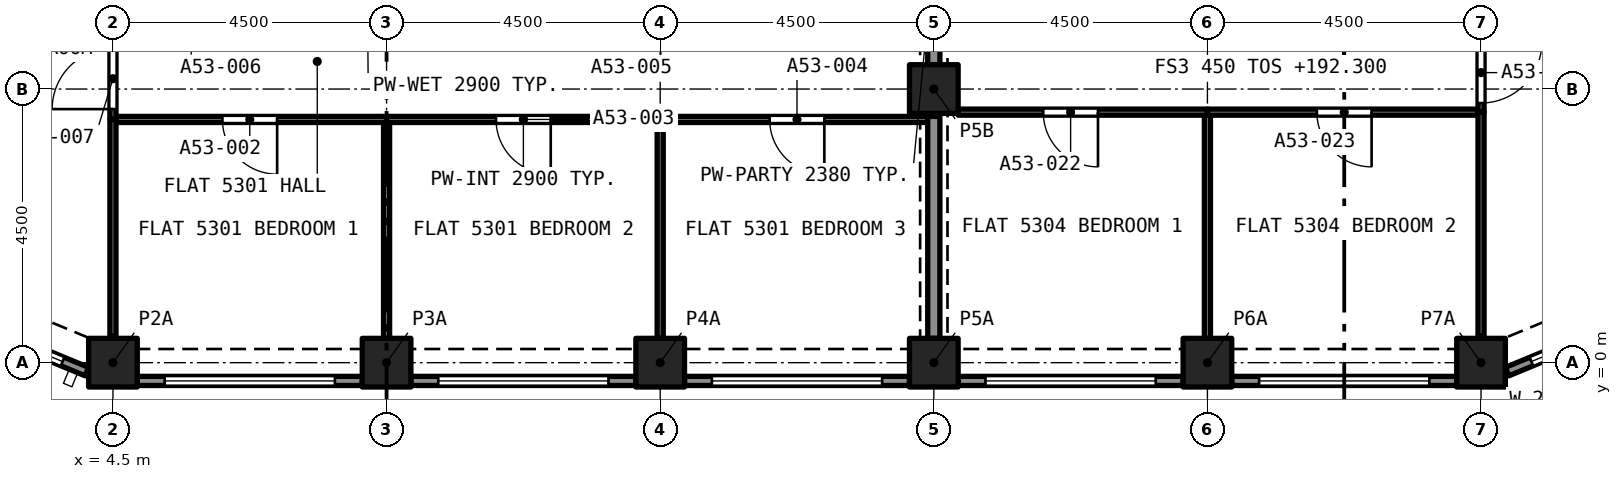
"""IFC4 building model, lengths in metres.
Left out: names, types, materials, properties, quantities, classifications, styles, units other than length and angle.
Written with IfcOpenShell. Run it as: python <this file> out.ifc"""

import sys

from ifc_helpers import new_model, si_unit, direction, frame, frame_2d, origin, origin_2d, place, context, subcontext, project, spatial, rectangle, extrude, element, fill, save


model = new_model("IFC4")
c1 = context("Model", 3, precision=1e-05, world=origin(), true_north=direction((0.0, 1.0)))
c2 = subcontext(c1, "Body", "Model", "MODEL_VIEW")
j1 = project(units=[si_unit("LENGTHUNIT", "METRE"), si_unit("PLANEANGLEUNIT", "RADIAN")], contexts=[c1])
p1 = place(None, origin())
s1 = spatial("IfcSite", under=j1, at=p1, CompositionType="ELEMENT")
p2 = place(p1, origin())
s2 = spatial("IfcBuilding", under=s1, at=p2, CompositionType="ELEMENT")
p3 = place(p2, frame((0.0, 0.0, 192.3)))
s3 = spatial("IfcBuildingStorey", under=s2, at=p3, CompositionType="ELEMENT", Elevation=192.3)
for number, where, z_axis, x_axis in (
    (1, (4.5, 0.0, 0.0), (0.0, 0.0, 1.0), (1.0, 0.0, 0.0)),
    (2, (9.0, 0.0, 0.0), (0.0, 0.0, 1.0), (1.0, 0.0, 0.0)),
    (3, (13.5, 0.0, 0.0), (0.0, 0.0, 1.0), (1.0, 0.0, 0.0)),
    (4, (18.0, 0.0, 0.0), (0.0, 0.0, 1.0), (1.0, 0.0, 0.0)),
    (5, (22.5, 0.0, 0.0), (0.0, 0.0, 1.0), (1.0, 0.0, 0.0)),
    (6, (27.0, 0.0, 0.0), (0.0, 0.0, 1.0), (1.0, 0.0, 0.0)),
    (7, (18.0, 4.5, 0.0), (0.0, 0.0, 1.0), (1.0, 0.0, 0.0)),
):
    element("IfcColumn", number, at=place(p3, frame(where, z_axis=z_axis, x_axis=x_axis)), inside=s3, PredefinedType="COLUMN", context=c2, shape_type="SweptSolid", body=[
        extrude(rectangle(XDim=0.8, YDim=0.8, at=origin_2d()), origin(), (0.0, 0.0, 1.0), 3.2),
    ])
p4 = place(p3, frame((29.833, 0.849, 0.0), z_axis=(0.0, 0.0, 1.0), x_axis=(-0.923885342263, -0.382669406082, 0.0)))
e8 = element("IfcWall", 8, at=p4, inside=s3, PredefinedType="SOLIDWALL", context=c2, shape_type="SweptSolid", body=[
    extrude(rectangle(XDim=2.602, YDim=0.15, at=frame_2d((1.301, 0.0))), origin(), (0.0, 0.0, 1.0), 3.2),
])
p5 = place(p4, frame((0.27, 0.0, 0.45)))
e9 = element("IfcOpeningElement", 9, at=p5, cuts=e8, PredefinedType="OPENING", context=c2, shape_type="SweptSolid", body=[
    extrude(rectangle(XDim=1.9, YDim=1.95, at=frame_2d((0.95, 0.975))), frame((0.0, 0.085, 0.0), z_axis=(0.0, -1.0, 0.0), x_axis=(1.0, 0.0, 0.0)), (0.0, 0.0, 1.0), 0.17),
])
p6 = place(p3, frame((4.071, -0.147, 0.0), z_axis=(0.0, 0.0, 1.0), x_axis=(-0.923885342263, 0.382669406082, 0.0)))
e10 = element("IfcWall", 10, at=p6, inside=s3, PredefinedType="SOLIDWALL", context=c2, shape_type="SweptSolid", body=[
    extrude(rectangle(XDim=2.602, YDim=0.15, at=frame_2d((1.301, 0.0))), origin(), (0.0, 0.0, 1.0), 3.2),
])
p7 = place(p6, frame((0.432, 0.0, 0.45)))
e11 = element("IfcOpeningElement", 11, at=p7, cuts=e10, PredefinedType="OPENING", context=c2, shape_type="SweptSolid", body=[
    extrude(rectangle(XDim=1.9, YDim=1.95, at=frame_2d((0.95, 0.975))), frame((0.0, 0.085, 0.0), z_axis=(0.0, -1.0, 0.0), x_axis=(1.0, 0.0, 0.0)), (0.0, 0.0, 1.0), 0.17),
])
p8 = place(p3, frame((8.6, -0.3, 0.0), z_axis=(0.0, 0.0, 1.0), x_axis=(-1.0, 0.0, 0.0)))
e12 = element("IfcWall", 12, at=p8, inside=s3, PredefinedType="SOLIDWALL", context=c2, shape_type="SweptSolid", body=[
    extrude(rectangle(XDim=3.7, YDim=0.15, at=frame_2d((1.85, 0.0))), origin(), (0.0, 0.0, 1.0), 3.2),
])
p9 = place(p8, frame((0.45, 0.0, 0.45)))
e13 = element("IfcOpeningElement", 13, at=p9, cuts=e12, PredefinedType="OPENING", context=c2, shape_type="SweptSolid", body=[
    extrude(rectangle(XDim=2.8, YDim=1.95, at=frame_2d((1.4, 0.975))), frame((0.0, 0.085, 0.0), z_axis=(0.0, -1.0, 0.0), x_axis=(1.0, 0.0, 0.0)), (0.0, 0.0, 1.0), 0.17),
])
p10 = place(p3, frame((13.1, -0.3, 0.0), z_axis=(0.0, 0.0, 1.0), x_axis=(-1.0, 0.0, 0.0)))
e14 = element("IfcWall", 14, at=p10, inside=s3, PredefinedType="SOLIDWALL", context=c2, shape_type="SweptSolid", body=[
    extrude(rectangle(XDim=3.7, YDim=0.15, at=frame_2d((1.85, 0.0))), origin(), (0.0, 0.0, 1.0), 3.2),
])
p11 = place(p10, frame((0.45, 0.0, 0.45)))
e15 = element("IfcOpeningElement", 15, at=p11, cuts=e14, PredefinedType="OPENING", context=c2, shape_type="SweptSolid", body=[
    extrude(rectangle(XDim=2.8, YDim=1.95, at=frame_2d((1.4, 0.975))), frame((0.0, 0.085, 0.0), z_axis=(0.0, -1.0, 0.0), x_axis=(1.0, 0.0, 0.0)), (0.0, 0.0, 1.0), 0.17),
])
p12 = place(p3, frame((17.6, -0.3, 0.0), z_axis=(0.0, 0.0, 1.0), x_axis=(-1.0, 0.0, 0.0)))
e16 = element("IfcWall", 16, at=p12, inside=s3, PredefinedType="SOLIDWALL", context=c2, shape_type="SweptSolid", body=[
    extrude(rectangle(XDim=3.7, YDim=0.15, at=frame_2d((1.85, 0.0))), origin(), (0.0, 0.0, 1.0), 3.2),
])
p13 = place(p12, frame((0.45, 0.0, 0.45)))
e17 = element("IfcOpeningElement", 17, at=p13, cuts=e16, PredefinedType="OPENING", context=c2, shape_type="SweptSolid", body=[
    extrude(rectangle(XDim=2.8, YDim=1.95, at=frame_2d((1.4, 0.975))), frame((0.0, 0.085, 0.0), z_axis=(0.0, -1.0, 0.0), x_axis=(1.0, 0.0, 0.0)), (0.0, 0.0, 1.0), 0.17),
])
p14 = place(p3, frame((22.1, -0.3, 0.0), z_axis=(0.0, 0.0, 1.0), x_axis=(-1.0, 0.0, 0.0)))
e18 = element("IfcWall", 18, at=p14, inside=s3, PredefinedType="SOLIDWALL", context=c2, shape_type="SweptSolid", body=[
    extrude(rectangle(XDim=3.7, YDim=0.15, at=frame_2d((1.85, 0.0))), origin(), (0.0, 0.0, 1.0), 3.2),
])
p15 = place(p14, frame((0.45, 0.0, 0.45)))
e19 = element("IfcOpeningElement", 19, at=p15, cuts=e18, PredefinedType="OPENING", context=c2, shape_type="SweptSolid", body=[
    extrude(rectangle(XDim=2.8, YDim=1.95, at=frame_2d((1.4, 0.975))), frame((0.0, 0.085, 0.0), z_axis=(0.0, -1.0, 0.0), x_axis=(1.0, 0.0, 0.0)), (0.0, 0.0, 1.0), 0.17),
])
p16 = place(p3, frame((26.6, -0.3, 0.0), z_axis=(0.0, 0.0, 1.0), x_axis=(-1.0, 0.0, 0.0)))
e20 = element("IfcWall", 20, at=p16, inside=s3, PredefinedType="SOLIDWALL", context=c2, shape_type="SweptSolid", body=[
    extrude(rectangle(XDim=3.7, YDim=0.15, at=frame_2d((1.85, 0.0))), origin(), (0.0, 0.0, 1.0), 3.2),
])
p17 = place(p16, frame((0.45, 0.0, 0.45)))
e21 = element("IfcOpeningElement", 21, at=p17, cuts=e20, PredefinedType="OPENING", context=c2, shape_type="SweptSolid", body=[
    extrude(rectangle(XDim=2.8, YDim=1.95, at=frame_2d((1.4, 0.975))), frame((0.0, 0.085, 0.0), z_axis=(0.0, -1.0, 0.0), x_axis=(1.0, 0.0, 0.0)), (0.0, 0.0, 1.0), 0.17),
])
p18 = place(p3, frame((9.0, 0.4, 0.0), z_axis=(0.0, 0.0, 1.0), x_axis=(0.0, 1.0, 0.0)))
e22 = element("IfcWall", 22, at=p18, inside=s3, PredefinedType="PARTITIONING", context=c2, shape_type="SweptSolid", body=[
    extrude(rectangle(XDim=3.55, YDim=0.1, at=frame_2d((1.775, 0.0))), origin(), (0.0, 0.0, 1.0), 2.9),
])
p19 = place(p3, frame((9.0, 4.0, 0.0), z_axis=(0.0, 0.0, 1.0), x_axis=(-1.0, 0.0, 0.0)))
e23 = element("IfcWall", 23, at=p19, inside=s3, PredefinedType="PARTITIONING", context=c2, shape_type="SweptSolid", body=[
    extrude(rectangle(XDim=4.45, YDim=0.1, at=frame_2d((2.225, 0.0))), origin(), (0.0, 0.0, 1.0), 2.9),
])
p20 = place(p19, frame((1.8, 0.0, 0.0)))
e24 = element("IfcOpeningElement", 24, at=p20, cuts=e23, PredefinedType="OPENING", context=c2, shape_type="SweptSolid", body=[
    extrude(rectangle(XDim=0.9, YDim=2.1, at=frame_2d((0.45, 1.05))), frame((0.0, 0.06, 0.0), z_axis=(0.0, -1.0, 0.0), x_axis=(1.0, 0.0, 0.0)), (0.0, 0.0, 1.0), 0.12),
])
p21 = place(p3, frame((4.5, 0.433, 0.0), z_axis=(0.0, 0.0, 1.0), x_axis=(0.0, 1.0, 0.0)))
e25 = element("IfcWall", 25, at=p21, inside=s3, PredefinedType="PARTITIONING", context=c2, shape_type="SweptSolid", body=[
    extrude(rectangle(XDim=3.567, YDim=0.1, at=frame_2d((1.784, 0.0))), origin(), (0.0, 0.0, 1.0), 2.9),
])
p22 = place(p3, frame((13.5, 0.4, 0.0), z_axis=(0.0, 0.0, 1.0), x_axis=(0.0, 1.0, 0.0)))
e26 = element("IfcWall", 26, at=p22, inside=s3, PredefinedType="PARTITIONING", context=c2, shape_type="SweptSolid", body=[
    extrude(rectangle(XDim=3.55, YDim=0.1, at=frame_2d((1.775, 0.0))), origin(), (0.0, 0.0, 1.0), 2.9),
])
p23 = place(p3, frame((13.5, 4.0, 0.0), z_axis=(0.0, 0.0, 1.0), x_axis=(-1.0, 0.0, 0.0)))
e27 = element("IfcWall", 27, at=p23, inside=s3, PredefinedType="PARTITIONING", context=c2, shape_type="SweptSolid", body=[
    extrude(rectangle(XDim=4.5, YDim=0.1, at=frame_2d((2.25, 0.0))), origin(), (0.0, 0.0, 1.0), 2.9),
])
p24 = place(p23, frame((1.8, 0.0, 0.0)))
e28 = element("IfcOpeningElement", 28, at=p24, cuts=e27, PredefinedType="OPENING", context=c2, shape_type="SweptSolid", body=[
    extrude(rectangle(XDim=0.9, YDim=2.1, at=frame_2d((0.45, 1.05))), frame((0.0, 0.06, 0.0), z_axis=(0.0, -1.0, 0.0), x_axis=(1.0, 0.0, 0.0)), (0.0, 0.0, 1.0), 0.12),
])
p25 = place(p3, frame((17.9, 4.0, 0.0), z_axis=(0.0, 0.0, 1.0), x_axis=(-1.0, 0.0, 0.0)))
e29 = element("IfcWall", 29, at=p25, inside=s3, PredefinedType="PARTITIONING", context=c2, shape_type="SweptSolid", body=[
    extrude(rectangle(XDim=4.4, YDim=0.1, at=frame_2d((2.2, 0.0))), origin(), (0.0, 0.0, 1.0), 2.9),
])
p26 = place(p25, frame((1.7, 0.0, 0.0)))
e30 = element("IfcOpeningElement", 30, at=p26, cuts=e29, PredefinedType="OPENING", context=c2, shape_type="SweptSolid", body=[
    extrude(rectangle(XDim=0.9, YDim=2.1, at=frame_2d((0.45, 1.05))), frame((0.0, 0.06, 0.0), z_axis=(0.0, -1.0, 0.0), x_axis=(1.0, 0.0, 0.0)), (0.0, 0.0, 1.0), 0.12),
])
p27 = place(p3, frame((18.0, 0.4, 0.0), z_axis=(0.0, 0.0, 1.0), x_axis=(0.0, 1.0, 0.0)))
e31 = element("IfcWall", 31, at=p27, inside=s3, PredefinedType="PARTITIONING", context=c2, shape_type="SweptSolid", body=[
    extrude(rectangle(XDim=3.65, YDim=0.2, at=frame_2d((1.825, 0.0))), origin(), (0.0, 0.0, 1.0), 2.38),
])
p28 = place(p3, frame((4.5, 4.0, 0.0), z_axis=(0.0, 0.0, 1.0), x_axis=(0.0, 1.0, 0.0)))
e32 = element("IfcWall", 32, at=p28, inside=s3, PredefinedType="PARTITIONING", context=c2, shape_type="SweptSolid", body=[
    extrude(rectangle(XDim=1.34, YDim=0.1, at=frame_2d((0.67, 0.0))), origin(), (0.0, 0.0, 1.0), 2.9),
])
p29 = place(p28, frame((0.17, 0.0, 0.0)))
e33 = element("IfcOpeningElement", 33, at=p29, cuts=e32, PredefinedType="OPENING", context=c2, shape_type="SweptSolid", body=[
    extrude(rectangle(XDim=1.0, YDim=2.1, at=frame_2d((0.5, 1.05))), frame((0.0, 0.06, 0.0), z_axis=(0.0, -1.0, 0.0), x_axis=(1.0, 0.0, 0.0)), (0.0, 0.0, 1.0), 0.12),
])
p30 = place(p3, frame((18.0, 4.9, 0.0), z_axis=(0.0, 0.0, 1.0), x_axis=(0.0, 1.0, 0.0)))
e34 = element("IfcWall", 34, at=p30, inside=s3, PredefinedType="PARTITIONING", context=c2, shape_type="SweptSolid", body=[
    extrude(rectangle(XDim=3.7, YDim=0.2, at=frame_2d((1.85, 0.0))), origin(), (0.0, 0.0, 1.0), 2.38),
])
p31 = place(p3, frame((22.5, 0.4, 0.0), z_axis=(0.0, 0.0, 1.0), x_axis=(0.0, 1.0, 0.0)))
e35 = element("IfcWall", 35, at=p31, inside=s3, PredefinedType="PARTITIONING", context=c2, shape_type="SweptSolid", body=[
    extrude(rectangle(XDim=3.67, YDim=0.1, at=frame_2d((1.835, 0.0))), origin(), (0.0, 0.0, 1.0), 2.75),
])
p32 = place(p3, frame((22.5, 4.12, 0.0), z_axis=(0.0, 0.0, 1.0), x_axis=(-1.0, 0.0, 0.0)))
e36 = element("IfcWall", 36, at=p32, inside=s3, PredefinedType="PARTITIONING", context=c2, shape_type="SweptSolid", body=[
    extrude(rectangle(XDim=4.1, YDim=0.1, at=frame_2d((2.05, 0.0))), origin(), (0.0, 0.0, 1.0), 2.75),
])
p33 = place(p32, frame((1.8, 0.0, 0.0)))
e37 = element("IfcOpeningElement", 37, at=p33, cuts=e36, PredefinedType="OPENING", context=c2, shape_type="SweptSolid", body=[
    extrude(rectangle(XDim=0.9, YDim=2.1, at=frame_2d((0.45, 1.05))), frame((0.0, 0.06, 0.0), z_axis=(0.0, -1.0, 0.0), x_axis=(1.0, 0.0, 0.0)), (0.0, 0.0, 1.0), 0.12),
])
p34 = place(p3, frame((26.95, 4.12, 0.0), z_axis=(0.0, 0.0, 1.0), x_axis=(-1.0, 0.0, 0.0)))
e38 = element("IfcWall", 38, at=p34, inside=s3, PredefinedType="PARTITIONING", context=c2, shape_type="SweptSolid", body=[
    extrude(rectangle(XDim=4.45, YDim=0.1, at=frame_2d((2.225, 0.0))), origin(), (0.0, 0.0, 1.0), 2.75),
])
p35 = place(p34, frame((1.75, 0.0, 0.0)))
e39 = element("IfcOpeningElement", 39, at=p35, cuts=e38, PredefinedType="OPENING", context=c2, shape_type="SweptSolid", body=[
    extrude(rectangle(XDim=0.9, YDim=2.1, at=frame_2d((0.45, 1.05))), frame((0.0, 0.06, 0.0), z_axis=(0.0, -1.0, 0.0), x_axis=(1.0, 0.0, 0.0)), (0.0, 0.0, 1.0), 0.12),
])
p36 = place(p3, frame((27.0, 0.433, 0.0), z_axis=(0.0, 0.0, 1.0), x_axis=(0.0, 1.0, 0.0)))
e40 = element("IfcWall", 40, at=p36, inside=s3, PredefinedType="PARTITIONING", context=c2, shape_type="SweptSolid", body=[
    extrude(rectangle(XDim=3.687, YDim=0.1, at=frame_2d((1.844, 0.0))), origin(), (0.0, 0.0, 1.0), 2.75),
])
p37 = place(p3, frame((27.0, 5.42, 0.0), z_axis=(0.0, 0.0, 1.0), x_axis=(0.0, -1.0, 0.0)))
e41 = element("IfcWall", 41, at=p37, inside=s3, PredefinedType="PARTITIONING", context=c2, shape_type="SweptSolid", body=[
    extrude(rectangle(XDim=1.3, YDim=0.1, at=frame_2d((0.65, 0.0))), origin(), (0.0, 0.0, 1.0), 2.75),
])
p38 = place(p37, frame((0.15, 0.0, 0.0)))
e42 = element("IfcOpeningElement", 42, at=p38, cuts=e41, PredefinedType="OPENING", context=c2, shape_type="SweptSolid", body=[
    extrude(rectangle(XDim=1.0, YDim=2.1, at=frame_2d((0.5, 1.05))), frame((0.0, 0.06, 0.0), z_axis=(0.0, -1.0, 0.0), x_axis=(1.0, 0.0, 0.0)), (0.0, 0.0, 1.0), 0.12),
])
p39 = place(p5, origin())
e43 = element("IfcWindow", 43, at=p39, inside=s3, PartitioningType="SINGLE_PANEL", PredefinedType="WINDOW", context=c2, shape_type="SweptSolid", body=[
    extrude(rectangle(XDim=1.9, YDim=1.95, at=frame_2d((0.95, 0.975))), frame((0.0, 0.03, 0.0), z_axis=(0.0, -1.0, 0.0), x_axis=(1.0, 0.0, 0.0)), (0.0, 0.0, 1.0), 0.06),
])
fill(e9, e43)
p40 = place(p7, origin())
e44 = element("IfcWindow", 44, at=p40, inside=s3, PartitioningType="SINGLE_PANEL", PredefinedType="WINDOW", context=c2, shape_type="SweptSolid", body=[
    extrude(rectangle(XDim=1.9, YDim=1.95, at=frame_2d((0.95, 0.975))), frame((0.0, 0.03, 0.0), z_axis=(0.0, -1.0, 0.0), x_axis=(1.0, 0.0, 0.0)), (0.0, 0.0, 1.0), 0.06),
])
fill(e11, e44)
p41 = place(p9, origin())
e45 = element("IfcWindow", 45, at=p41, inside=s3, PartitioningType="SINGLE_PANEL", PredefinedType="WINDOW", context=c2, shape_type="SweptSolid", body=[
    extrude(rectangle(XDim=2.8, YDim=1.95, at=frame_2d((1.4, 0.975))), frame((0.0, 0.03, 0.0), z_axis=(0.0, -1.0, 0.0), x_axis=(1.0, 0.0, 0.0)), (0.0, 0.0, 1.0), 0.06),
])
fill(e13, e45)
p42 = place(p11, origin())
e46 = element("IfcWindow", 46, at=p42, inside=s3, PartitioningType="SINGLE_PANEL", PredefinedType="WINDOW", context=c2, shape_type="SweptSolid", body=[
    extrude(rectangle(XDim=2.8, YDim=1.95, at=frame_2d((1.4, 0.975))), frame((0.0, 0.03, 0.0), z_axis=(0.0, -1.0, 0.0), x_axis=(1.0, 0.0, 0.0)), (0.0, 0.0, 1.0), 0.06),
])
fill(e15, e46)
p43 = place(p13, origin())
e47 = element("IfcWindow", 47, at=p43, inside=s3, PartitioningType="SINGLE_PANEL", PredefinedType="WINDOW", context=c2, shape_type="SweptSolid", body=[
    extrude(rectangle(XDim=2.8, YDim=1.95, at=frame_2d((1.4, 0.975))), frame((0.0, 0.03, 0.0), z_axis=(0.0, -1.0, 0.0), x_axis=(1.0, 0.0, 0.0)), (0.0, 0.0, 1.0), 0.06),
])
fill(e17, e47)
p44 = place(p15, origin())
e48 = element("IfcWindow", 48, at=p44, inside=s3, PartitioningType="SINGLE_PANEL", PredefinedType="WINDOW", context=c2, shape_type="SweptSolid", body=[
    extrude(rectangle(XDim=2.8, YDim=1.95, at=frame_2d((1.4, 0.975))), frame((0.0, 0.03, 0.0), z_axis=(0.0, -1.0, 0.0), x_axis=(1.0, 0.0, 0.0)), (0.0, 0.0, 1.0), 0.06),
])
fill(e19, e48)
p45 = place(p17, origin())
e49 = element("IfcWindow", 49, at=p45, inside=s3, PartitioningType="SINGLE_PANEL", PredefinedType="WINDOW", context=c2, shape_type="SweptSolid", body=[
    extrude(rectangle(XDim=2.8, YDim=1.95, at=frame_2d((1.4, 0.975))), frame((0.0, 0.03, 0.0), z_axis=(0.0, -1.0, 0.0), x_axis=(1.0, 0.0, 0.0)), (0.0, 0.0, 1.0), 0.06),
])
fill(e21, e49)
p46 = place(p20, origin())
e50 = element("IfcDoor", 50, at=p46, inside=s3, OperationType="SINGLE_SWING_RIGHT", PredefinedType="DOOR", context=c2, shape_type="SweptSolid", body=[
    extrude(rectangle(XDim=0.9, YDim=2.1, at=frame_2d((0.45, 1.05))), frame((0.0, 0.025, 0.0), z_axis=(0.0, -1.0, 0.0), x_axis=(1.0, 0.0, 0.0)), (0.0, 0.0, 1.0), 0.05),
])
fill(e24, e50)
p47 = place(p24, origin())
e51 = element("IfcDoor", 51, at=p47, inside=s3, OperationType="SINGLE_SWING_LEFT", PredefinedType="DOOR", context=c2, shape_type="SweptSolid", body=[
    extrude(rectangle(XDim=0.9, YDim=2.1, at=frame_2d((0.45, 1.05))), frame((0.0, 0.025, 0.0), z_axis=(0.0, -1.0, 0.0), x_axis=(1.0, 0.0, 0.0)), (0.0, 0.0, 1.0), 0.05),
])
fill(e28, e51)
p48 = place(p26, origin())
e52 = element("IfcDoor", 52, at=p48, inside=s3, OperationType="SINGLE_SWING_LEFT", PredefinedType="DOOR", context=c2, shape_type="SweptSolid", body=[
    extrude(rectangle(XDim=0.9, YDim=2.1, at=frame_2d((0.45, 1.05))), frame((0.0, 0.025, 0.0), z_axis=(0.0, -1.0, 0.0), x_axis=(1.0, 0.0, 0.0)), (0.0, 0.0, 1.0), 0.05),
])
fill(e30, e52)
p49 = place(p29, origin())
e53 = element("IfcDoor", 53, at=p49, inside=s3, OperationType="SINGLE_SWING_RIGHT", PredefinedType="DOOR", context=c2, shape_type="SweptSolid", body=[
    extrude(rectangle(XDim=1.0, YDim=2.1, at=frame_2d((0.5, 1.05))), frame((0.0, 0.025, 0.0), z_axis=(0.0, -1.0, 0.0), x_axis=(1.0, 0.0, 0.0)), (0.0, 0.0, 1.0), 0.05),
])
fill(e33, e53)
p50 = place(p33, origin())
e54 = element("IfcDoor", 54, at=p50, inside=s3, OperationType="SINGLE_SWING_RIGHT", PredefinedType="DOOR", context=c2, shape_type="SweptSolid", body=[
    extrude(rectangle(XDim=0.9, YDim=2.1, at=frame_2d((0.45, 1.05))), frame((0.0, 0.025, 0.0), z_axis=(0.0, -1.0, 0.0), x_axis=(1.0, 0.0, 0.0)), (0.0, 0.0, 1.0), 0.05),
])
fill(e37, e54)
p51 = place(p35, origin())
e55 = element("IfcDoor", 55, at=p51, inside=s3, OperationType="SINGLE_SWING_LEFT", PredefinedType="DOOR", context=c2, shape_type="SweptSolid", body=[
    extrude(rectangle(XDim=0.9, YDim=2.1, at=frame_2d((0.45, 1.05))), frame((0.0, 0.025, 0.0), z_axis=(0.0, -1.0, 0.0), x_axis=(1.0, 0.0, 0.0)), (0.0, 0.0, 1.0), 0.05),
])
fill(e39, e55)
p52 = place(p38, origin())
e56 = element("IfcDoor", 56, at=p52, inside=s3, OperationType="SINGLE_SWING_LEFT", PredefinedType="DOOR", context=c2, shape_type="SweptSolid", body=[
    extrude(rectangle(XDim=1.0, YDim=2.1, at=frame_2d((0.5, 1.05))), frame((0.0, 0.025, 0.0), z_axis=(0.0, -1.0, 0.0), x_axis=(1.0, 0.0, 0.0)), (0.0, 0.0, 1.0), 0.05),
])
fill(e42, e56)
save(model, sys.argv[1])
